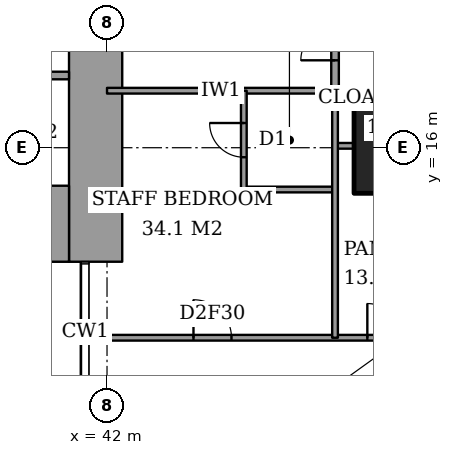
"""IFC4 building model, lengths in metres.
Left out: names, types, materials, properties, quantities, classifications, styles, units other than length and angle.
Written with IfcOpenShell. Run it as: python <this file> out.ifc"""

import sys

from ifc_helpers import new_model, si_unit, direction, frame, frame_2d, origin, origin_2d, place, context, subcontext, project, spatial, rectangle, extrude, element, fill, save


model = new_model("IFC4")
c1 = context("Model", 3, precision=1e-05, world=origin(), true_north=direction((0.0, 1.0)))
c2 = subcontext(c1, "Body", "Model", "MODEL_VIEW")
j1 = project(units=[si_unit("LENGTHUNIT", "METRE"), si_unit("PLANEANGLEUNIT", "RADIAN")], contexts=[c1])
p1 = place(None, origin())
s1 = spatial("IfcSite", under=j1, at=p1, CompositionType="ELEMENT")
p2 = place(p1, origin())
s2 = spatial("IfcBuilding", under=s1, at=p2, CompositionType="ELEMENT")
p3 = place(p2, frame((0.0, 0.0, 214.6)))
s3 = spatial("IfcBuildingStorey", under=s2, at=p3, CompositionType="ELEMENT", Elevation=214.6)
p4 = place(p3, frame((50.0, 16.0, 0.0), z_axis=(0.0, 0.0, 1.0), x_axis=(1.0, 0.0, 0.0)))
e1 = element("IfcColumn", 1, at=p4, inside=s3, PredefinedType="COLUMN", context=c2, shape_type="SweptSolid", body=[
    extrude(rectangle(XDim=3.0, YDim=2.4, at=origin_2d()), origin(), (0.0, 0.0, 1.0), 3.6),
])
p5 = place(p3, frame((37.85, 14.0, 0.0), z_axis=(0.0, 0.0, 1.0), x_axis=(1.0, 0.0, 0.0)))
e2 = element("IfcWall", 2, at=p5, inside=s3, PredefinedType="SHEAR", context=c2, shape_type="SweptSolid", body=[
    extrude(rectangle(XDim=3.15, YDim=2.0, at=frame_2d((1.575, 0.0))), origin(), (0.0, 0.0, 1.0), 3.6),
])
p6 = place(p3, frame((41.7, 13.0, 0.0), z_axis=(0.0, 0.0, 1.0), x_axis=(0.0, 1.0, 0.0)))
e3 = element("IfcWall", 3, at=p6, inside=s3, PredefinedType="SHEAR", context=c2, shape_type="SweptSolid", body=[
    extrude(rectangle(XDim=11.85, YDim=1.4, at=frame_2d((5.925, 0.0))), origin(), (0.0, 0.0, 1.0), 3.6),
])
p7 = place(p6, frame((7.5, 0.0, 0.0)))
e4 = element("IfcOpeningElement", 4, at=p7, cuts=e3, PredefinedType="OPENING", context=c2, shape_type="SweptSolid", body=[
    extrude(rectangle(XDim=1.8, YDim=2.4, at=frame_2d((0.9, 1.2))), frame((0.0, 0.71, 0.0), z_axis=(0.0, -1.0, 0.0), x_axis=(1.0, 0.0, 0.0)), (0.0, 0.0, 1.0), 1.42),
])
p8 = place(p3, frame((41.439, 11.0, 0.0), z_axis=(0.0, 0.0, 1.0), x_axis=(1.0, 0.0, 0.0)))
e5 = element("IfcWall", 5, at=p8, inside=s3, PredefinedType="PARTITIONING", context=c2, shape_type="SweptSolid", body=[
    extrude(rectangle(XDim=25.011, YDim=0.15, at=frame_2d((12.505, 0.0))), origin(), (0.0, 0.0, 1.0), 3.35),
])
p9 = place(p8, frame((12.361, 0.0, 0.0)))
e6 = element("IfcOpeningElement", 6, at=p9, cuts=e5, PredefinedType="OPENING", context=c2, shape_type="SweptSolid", body=[
    extrude(rectangle(XDim=1.0, YDim=2.1, at=frame_2d((0.5, 1.05))), frame((0.0, 0.085, 0.0), z_axis=(0.0, -1.0, 0.0), x_axis=(1.0, 0.0, 0.0)), (0.0, 0.0, 1.0), 0.17),
])
p10 = place(p8, frame((20.924, 0.0, 0.0)))
e7 = element("IfcOpeningElement", 7, at=p10, cuts=e5, PredefinedType="OPENING", context=c2, shape_type="SweptSolid", body=[
    extrude(rectangle(XDim=1.0, YDim=2.1, at=frame_2d((0.5, 1.05))), frame((0.0, 0.085, 0.0), z_axis=(0.0, -1.0, 0.0), x_axis=(1.0, 0.0, 0.0)), (0.0, 0.0, 1.0), 0.17),
])
p11 = place(p8, frame((15.448, 0.0, 0.0)))
e8 = element("IfcOpeningElement", 8, at=p11, cuts=e5, PredefinedType="OPENING", context=c2, shape_type="SweptSolid", body=[
    extrude(rectangle(XDim=0.9, YDim=2.1, at=frame_2d((0.45, 1.05))), frame((0.0, 0.085, 0.0), z_axis=(0.0, -1.0, 0.0), x_axis=(1.0, 0.0, 0.0)), (0.0, 0.0, 1.0), 0.17),
])
p12 = place(p8, frame((9.961, 0.0, 0.0)))
e9 = element("IfcOpeningElement", 9, at=p12, cuts=e5, PredefinedType="OPENING", context=c2, shape_type="SweptSolid", body=[
    extrude(rectangle(XDim=1.0, YDim=2.1, at=frame_2d((0.5, 1.05))), frame((0.0, 0.085, 0.0), z_axis=(0.0, -1.0, 0.0), x_axis=(1.0, 0.0, 0.0)), (0.0, 0.0, 1.0), 0.17),
])
p13 = place(p8, frame((7.411, 0.0, 0.0)))
e10 = element("IfcOpeningElement", 10, at=p13, cuts=e5, PredefinedType="OPENING", context=c2, shape_type="SweptSolid", body=[
    extrude(rectangle(XDim=0.9, YDim=2.1, at=frame_2d((0.45, 1.05))), frame((0.0, 0.085, 0.0), z_axis=(0.0, -1.0, 0.0), x_axis=(1.0, 0.0, 0.0)), (0.0, 0.0, 1.0), 0.17),
])
p14 = place(p8, frame((2.836, 0.0, 0.0)))
e11 = element("IfcOpeningElement", 11, at=p14, cuts=e5, PredefinedType="OPENING", context=c2, shape_type="SweptSolid", body=[
    extrude(rectangle(XDim=1.0, YDim=2.1, at=frame_2d((0.5, 1.05))), frame((0.0, 0.085, 0.0), z_axis=(0.0, -1.0, 0.0), x_axis=(1.0, 0.0, 0.0)), (0.0, 0.0, 1.0), 0.17),
])
p15 = place(p3, frame((45.6, 14.9, 0.0), z_axis=(0.0, 0.0, 1.0), x_axis=(1.0, 0.0, 0.0)))
e12 = element("IfcWall", 12, at=p15, inside=s3, PredefinedType="PARTITIONING", context=c2, shape_type="SweptSolid", body=[
    extrude(rectangle(XDim=2.4, YDim=0.15, at=frame_2d((1.2, 0.0))), origin(), (0.0, 0.0, 1.0), 3.35),
])
p16 = place(p3, frame((48.0, 16.05, 0.0), z_axis=(0.0, 0.0, 1.0), x_axis=(1.0, 0.0, 0.0)))
e13 = element("IfcWall", 13, at=p16, inside=s3, PredefinedType="PARTITIONING", context=c2, shape_type="SweptSolid", body=[
    extrude(rectangle(XDim=0.5, YDim=0.15, at=frame_2d((0.25, 0.0))), origin(), (0.0, 0.0, 1.0), 2.634),
])
p17 = place(p3, frame((42.0, 17.5, 0.0), z_axis=(0.0, 0.0, 1.0), x_axis=(1.0, 0.0, 0.0)))
e14 = element("IfcWall", 14, at=p17, inside=s3, PredefinedType="PARTITIONING", context=c2, shape_type="SweptSolid", body=[
    extrude(rectangle(XDim=6.0, YDim=0.15, at=frame_2d((3.0, 0.0))), origin(), (0.0, 0.0, 1.0), 3.35),
])
p18 = place(p3, frame((45.6, 14.9, 0.0), z_axis=(0.0, 0.0, 1.0), x_axis=(0.0, 1.0, 0.0)))
e15 = element("IfcWall", 15, at=p18, inside=s3, PredefinedType="PARTITIONING", context=c2, shape_type="SweptSolid", body=[
    extrude(rectangle(XDim=2.6, YDim=0.15, at=frame_2d((1.3, 0.0))), origin(), (0.0, 0.0, 1.0), 3.35),
])
p19 = place(p18, frame((0.85, 0.0, 0.0)))
e16 = element("IfcOpeningElement", 16, at=p19, cuts=e15, PredefinedType="OPENING", context=c2, shape_type="SweptSolid", body=[
    extrude(rectangle(XDim=0.9, YDim=2.1, at=frame_2d((0.45, 1.05))), frame((0.0, 0.085, 0.0), z_axis=(0.0, -1.0, 0.0), x_axis=(1.0, 0.0, 0.0)), (0.0, 0.0, 1.0), 0.17),
])
p20 = place(p3, frame((48.0, 17.5, 0.0), z_axis=(0.0, 0.0, 1.0), x_axis=(0.0, 1.0, 0.0)))
e17 = element("IfcWall", 17, at=p20, inside=s3, PredefinedType="PARTITIONING", context=c2, shape_type="SweptSolid", body=[
    extrude(rectangle(XDim=6.5, YDim=0.2, at=frame_2d((3.25, 0.0))), origin(), (0.0, 0.0, 1.0), 3.35),
])
p21 = place(p20, frame((3.9, 0.0, 0.0)))
e18 = element("IfcOpeningElement", 18, at=p21, cuts=e17, PredefinedType="OPENING", context=c2, shape_type="SweptSolid", body=[
    extrude(rectangle(XDim=1.2, YDim=2.4, at=frame_2d((0.6, 1.2))), frame((0.0, 0.11, 0.0), z_axis=(0.0, -1.0, 0.0), x_axis=(1.0, 0.0, 0.0)), (0.0, 0.0, 1.0), 0.22),
])
p22 = place(p20, frame((0.8, 0.0, 0.0)))
e19 = element("IfcOpeningElement", 19, at=p22, cuts=e17, PredefinedType="OPENING", context=c2, shape_type="SweptSolid", body=[
    extrude(rectangle(XDim=0.9, YDim=2.1, at=frame_2d((0.45, 1.05))), frame((0.0, 0.11, 0.0), z_axis=(0.0, -1.0, 0.0), x_axis=(1.0, 0.0, 0.0)), (0.0, 0.0, 1.0), 0.22),
])
p23 = place(p3, frame((48.0, 11.0, 0.0), z_axis=(0.0, 0.0, 1.0), x_axis=(0.0, 1.0, 0.0)))
e20 = element("IfcWall", 20, at=p23, inside=s3, PredefinedType="PARTITIONING", context=c2, shape_type="SweptSolid", body=[
    extrude(rectangle(XDim=6.5, YDim=0.15, at=frame_2d((3.25, 0.0))), origin(), (0.0, 0.0, 1.0), 3.35),
])
p24 = place(p3, frame((28.3, 17.9, 0.0), z_axis=(0.0, 0.0, 1.0), x_axis=(1.0, 0.0, 0.0)))
e21 = element("IfcWall", 21, at=p24, inside=s3, PredefinedType="PARTITIONING", context=c2, shape_type="SweptSolid", body=[
    extrude(rectangle(XDim=12.7, YDim=0.2, at=frame_2d((6.35, 0.0))), origin(), (0.0, 0.0, 1.0), 3.6),
])
p25 = place(p24, frame((1.05, 0.0, 0.0)))
e22 = element("IfcOpeningElement", 22, at=p25, cuts=e21, PredefinedType="OPENING", context=c2, shape_type="SweptSolid", body=[
    extrude(rectangle(XDim=0.9, YDim=2.1, at=frame_2d((0.45, 1.05))), frame((0.0, 0.11, 0.0), z_axis=(0.0, -1.0, 0.0), x_axis=(1.0, 0.0, 0.0)), (0.0, 0.0, 1.0), 0.22),
])
p26 = place(p24, frame((4.2, 0.0, 0.0)))
e23 = element("IfcOpeningElement", 23, at=p26, cuts=e21, PredefinedType="OPENING", context=c2, shape_type="SweptSolid", body=[
    extrude(rectangle(XDim=1.0, YDim=2.1, at=frame_2d((0.5, 1.05))), frame((0.0, 0.11, 0.0), z_axis=(0.0, -1.0, 0.0), x_axis=(1.0, 0.0, 0.0)), (0.0, 0.0, 1.0), 0.22),
])
p27 = place(p24, frame((10.6, 0.0, 0.0)))
e24 = element("IfcOpeningElement", 24, at=p27, cuts=e21, PredefinedType="OPENING", context=c2, shape_type="SweptSolid", body=[
    extrude(rectangle(XDim=1.2, YDim=2.1, at=frame_2d((0.6, 1.05))), frame((0.0, 0.11, 0.0), z_axis=(0.0, -1.0, 0.0), x_axis=(1.0, 0.0, 0.0)), (0.0, 0.0, 1.0), 0.22),
])
p28 = place(p13, origin())
e25 = element("IfcDoor", 25, at=p28, inside=s3, OperationType="SINGLE_SWING_RIGHT", PredefinedType="DOOR", context=c2, shape_type="SweptSolid", body=[
    extrude(rectangle(XDim=0.9, YDim=2.1, at=frame_2d((0.45, 1.05))), frame((0.0, 0.025, 0.0), z_axis=(0.0, -1.0, 0.0), x_axis=(1.0, 0.0, 0.0)), (0.0, 0.0, 1.0), 0.05),
])
fill(e10, e25)
p29 = place(p19, origin())
e26 = element("IfcDoor", 26, at=p29, inside=s3, OperationType="SINGLE_SWING_LEFT", PredefinedType="DOOR", context=c2, shape_type="SweptSolid", body=[
    extrude(rectangle(XDim=0.9, YDim=2.1, at=frame_2d((0.45, 1.05))), frame((0.0, 0.025, 0.0), z_axis=(0.0, -1.0, 0.0), x_axis=(1.0, 0.0, 0.0)), (0.0, 0.0, 1.0), 0.05),
])
fill(e16, e26)
p30 = place(p14, origin())
e27 = element("IfcDoor", 27, at=p30, inside=s3, OperationType="SINGLE_SWING_RIGHT", PredefinedType="DOOR", context=c2, shape_type="SweptSolid", body=[
    extrude(rectangle(XDim=1.0, YDim=2.1, at=frame_2d((0.5, 1.05))), frame((0.0, 0.025, 0.0), z_axis=(0.0, -1.0, 0.0), x_axis=(1.0, 0.0, 0.0)), (0.0, 0.0, 1.0), 0.05),
])
fill(e11, e27)
p31 = place(p22, origin())
e28 = element("IfcDoor", 28, at=p31, inside=s3, OperationType="SINGLE_SWING_RIGHT", PredefinedType="DOOR", context=c2, shape_type="SweptSolid", body=[
    extrude(rectangle(XDim=0.9, YDim=2.1, at=frame_2d((0.45, 1.05))), frame((0.0, 0.025, 0.0), z_axis=(0.0, -1.0, 0.0), x_axis=(1.0, 0.0, 0.0)), (0.0, 0.0, 1.0), 0.05),
])
fill(e19, e28)
save(model, sys.argv[1])
